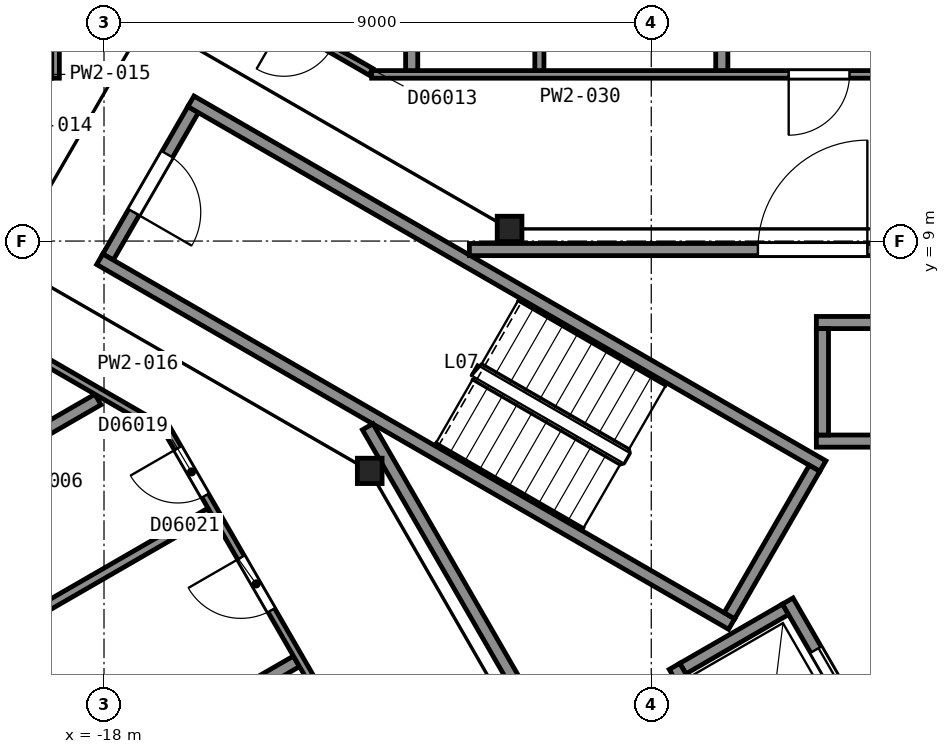
"""IFC4 building model, lengths in metres.
Left out: names, types, materials, properties, quantities, classifications, styles, units other than length and angle.
Written with IfcOpenShell. Run it as: python <this file> out.ifc"""

import sys

from ifc_helpers import new_model, si_unit, direction, frame, frame_2d, origin, origin_2d, place, context, subcontext, project, spatial, rectangle, i_section, extrude, element, fill, save


model = new_model("IFC4")
c1 = context("Model", 3, precision=1e-05, world=origin(), true_north=direction((0.0, 1.0)))
c2 = subcontext(c1, "Body", "Model", "MODEL_VIEW")
j1 = project(units=[si_unit("LENGTHUNIT", "METRE"), si_unit("PLANEANGLEUNIT", "RADIAN")], contexts=[c1])
p1 = place(None, origin())
s1 = spatial("IfcSite", under=j1, at=p1, CompositionType="ELEMENT")
p2 = place(p1, origin())
s2 = spatial("IfcBuilding", under=s1, at=p2, CompositionType="ELEMENT")
p3 = place(p2, frame((0.0, 0.0, 40.4)))
s3 = spatial("IfcBuildingStorey", under=s2, at=p3, CompositionType="ELEMENT", Elevation=40.4)
for number, where, z_axis, x_axis in (
    (1, (-11.33, 9.2, 0.0), (0.0, 0.0, 1.0), (1.0, 0.0, 0.0)),
    (2, (-13.63, 5.22, 0.0), (0.0, 0.0, 1.0), (1.0, 0.0, 0.0)),
):
    element("IfcColumn", number, at=place(p3, frame(where, z_axis=z_axis, x_axis=x_axis)), inside=s3, PredefinedType="COLUMN", context=c2, shape_type="SweptSolid", body=[
        extrude(i_section(OverallWidth=0.406, OverallDepth=0.417, WebThickness=0.03, FlangeThickness=0.048, FilletRadius=0.015, at=origin_2d()), origin(), (0.0, 0.0, 1.0), 3.6),
    ])
p4 = place(p3, frame((-16.534, 11.162, 0.0), z_axis=(0.0, 0.0, 1.0), x_axis=(-0.49998411664, -0.866034573852, 0.0)))
e3 = element("IfcWall", 3, at=p4, inside=s3, PredefinedType="PARTITIONING", context=c2, shape_type="SweptSolid", body=[
    extrude(rectangle(XDim=2.8, YDim=0.2, at=frame_2d((1.4, 0.0))), origin(), (0.0, 0.0, 1.0), 3.35),
])
p5 = place(p4, frame((0.85, 0.0, 0.0)))
e4 = element("IfcOpeningElement", 4, at=p5, cuts=e3, PredefinedType="OPENING", context=c2, shape_type="SweptSolid", body=[
    extrude(rectangle(XDim=1.1, YDim=2.1, at=frame_2d((0.55, 1.05))), frame((0.0, 0.11, 0.0), z_axis=(0.0, -1.0, 0.0), x_axis=(1.0, 0.0, 0.0)), (0.0, 0.0, 1.0), 0.22),
])
for number, where, z_axis, x_axis in (
    (5, (-7.678, 2.701, 0.0), (0.0, 0.0, 1.0), (-0.866, 0.5, 0.0)),
    (6, (-6.178, 5.299, 0.0), (0.0, 0.0, 1.0), (-0.866, 0.5, 0.0)),
):
    element("IfcWall", number, at=place(p3, frame(where, z_axis=z_axis, x_axis=x_axis)), inside=s3, PredefinedType="PARTITIONING", context=c2, shape_type="SweptSolid", body=[
        extrude(rectangle(XDim=12.0, YDim=0.2, at=frame_2d((6.0, 0.0))), origin(), (0.0, 0.0, 1.0), 3.35),
    ])
p6 = place(p3, frame((-6.315, 5.262, 0.0), z_axis=(0.0, 0.0, 1.0), x_axis=(-0.500049511043, -0.865996816683, 0.0)))
e7 = element("IfcWall", 7, at=p6, inside=s3, PredefinedType="PARTITIONING", context=c2, shape_type="SweptSolid", body=[
    extrude(rectangle(XDim=2.8, YDim=0.2, at=frame_2d((1.4, 0.0))), origin(), (0.0, 0.0, 1.0), 3.35),
])
for number, where, z_axis, x_axis in (
    (8, (-6.285, 5.71, 0.0), (0.0, 0.0, 1.0), (1.0, 0.0, 0.0)),
    (9, (-6.285, 7.66, 0.0), (0.0, 0.0, 1.0), (1.0, 0.0, 0.0)),
):
    element("IfcWall", number, at=place(p3, frame(where, z_axis=z_axis, x_axis=x_axis)), inside=s3, PredefinedType="PARTITIONING", context=c2, shape_type="SweptSolid", body=[
        extrude(rectangle(XDim=2.35, YDim=0.2, at=frame_2d((1.175, 0.0))), origin(), (0.0, 0.0, 1.0), 3.6),
    ])
p7 = place(p3, frame((-8.48, 1.969, 0.0), z_axis=(0.0, 0.0, 1.0), x_axis=(0.866000020948, 0.500043961785, 0.0)))
e10 = element("IfcWall", 10, at=p7, inside=s3, PredefinedType="PARTITIONING", context=c2, shape_type="SweptSolid", body=[
    extrude(rectangle(XDim=1.95, YDim=0.2, at=frame_2d((0.975, 0.0))), origin(), (0.0, 0.0, 1.0), 3.6),
])
p8 = place(p3, frame((-6.185, 5.81, 0.0), z_axis=(0.0, 0.0, 1.0), x_axis=(0.0, 1.0, 0.0)))
e11 = element("IfcWall", 11, at=p8, inside=s3, PredefinedType="PARTITIONING", context=c2, shape_type="SweptSolid", body=[
    extrude(rectangle(XDim=1.75, YDim=0.2, at=frame_2d((0.875, 0.0))), origin(), (0.0, 0.0, 1.0), 3.6),
])
p9 = place(p3, frame((-5.28, 0.525, 0.0), z_axis=(0.0, 0.0, 1.0), x_axis=(-0.500037662692, 0.866003658127, 0.0)))
e12 = element("IfcWall", 12, at=p9, inside=s3, PredefinedType="PARTITIONING", context=c2, shape_type="SweptSolid", body=[
    extrude(rectangle(XDim=2.95, YDim=0.2, at=frame_2d((1.475, 0.0))), origin(), (0.0, 0.0, 1.0), 3.6),
])
p10 = place(p9, frame((0.925, 0.0, 0.0)))
e13 = element("IfcOpeningElement", 13, at=p10, cuts=e12, PredefinedType="OPENING", context=c2, shape_type="SweptSolid", body=[
    extrude(rectangle(XDim=1.1, YDim=2.1, at=frame_2d((0.55, 1.05))), frame((0.0, 0.11, 0.0), z_axis=(0.0, -1.0, 0.0), x_axis=(1.0, 0.0, 0.0)), (0.0, 0.0, 1.0), 0.22),
])
p11 = place(p3, frame((-7.242, -0.376, 0.0), z_axis=(0.0, 0.0, 1.0), x_axis=(-0.499996545922, 0.866027397988, 0.0)))
e14 = element("IfcWall", 14, at=p11, inside=s3, PredefinedType="PARTITIONING", context=c2, shape_type="SweptSolid", body=[
    extrude(rectangle(XDim=2.75, YDim=0.2, at=frame_2d((1.375, 0.0))), origin(), (0.0, 0.0, 1.0), 3.6),
])
p12 = place(p3, frame((-13.664, 5.946, 0.0), z_axis=(0.0, 0.0, 1.0), x_axis=(0.499994327219, -0.866028678941, 0.0)))
e15 = element("IfcWall", 15, at=p12, inside=s3, PredefinedType="PARTITIONING", context=c2, shape_type="SweptSolid", body=[
    extrude(rectangle(XDim=23.968, YDim=0.2, at=frame_2d((11.984, 0.0))), origin(), (0.0, 0.0, 1.0), 3.35),
])
p13 = place(p3, frame((0.263, 8.86, 0.0), z_axis=(0.0, 0.0, 1.0), x_axis=(-1.0, 0.0, 0.0)))
e16 = element("IfcWall", 16, at=p13, inside=s3, PredefinedType="PARTITIONING", context=c2, shape_type="SweptSolid", body=[
    extrude(rectangle(XDim=12.254, YDim=0.2, at=frame_2d((6.127, 0.0))), origin(), (0.0, 0.0, 1.0), 3.35),
])
p14 = place(p13, frame((5.709, 0.0, 0.0)))
e17 = element("IfcOpeningElement", 17, at=p14, cuts=e16, PredefinedType="OPENING", context=c2, shape_type="SweptSolid", body=[
    extrude(rectangle(XDim=1.8, YDim=2.1, at=frame_2d((0.9, 1.05))), frame((0.0, 0.11, 0.0), z_axis=(0.0, -1.0, 0.0), x_axis=(1.0, 0.0, 0.0)), (0.0, 0.0, 1.0), 0.22),
])
p15 = place(p3, frame((-23.693, 0.247, 0.0), z_axis=(0.0, 0.0, 1.0), x_axis=(0.866031705461, 0.499989085017, 0.0)))
e18 = element("IfcWall", 18, at=p15, inside=s3, PredefinedType="PARTITIONING", context=c2, shape_type="SweptSolid", body=[
    extrude(rectangle(XDim=8.587, YDim=0.15, at=frame_2d((4.293, 0.0))), origin(), (0.0, 0.0, 1.0), 2.613),
])
p16 = place(p3, frame((-21.312, 4.54, 0.0), z_axis=(0.0, 0.0, 1.0), x_axis=(0.866071583234, 0.499920006315, 0.0)))
e19 = element("IfcWall", 19, at=p16, inside=s3, PredefinedType="PARTITIONING", context=c2, shape_type="SweptSolid", body=[
    extrude(rectangle(XDim=3.708, YDim=0.2, at=frame_2d((1.854, 0.0))), origin(), (0.0, 0.0, 1.0), 2.613),
])
p17 = place(p3, frame((-19.26, 7.194, 0.0), z_axis=(0.0, 0.0, 1.0), x_axis=(0.865944638795, -0.50013986298, 0.0)))
e20 = element("IfcWall", 20, at=p17, inside=s3, PredefinedType="PARTITIONING", context=c2, shape_type="SweptSolid", body=[
    extrude(rectangle(XDim=2.599, YDim=0.125, at=frame_2d((1.299, 0.0))), origin(), (0.0, 0.0, 1.0), 2.613),
])
p18 = place(p3, frame((-18.797, 11.678, 0.0), z_axis=(0.0, 0.0, 1.0), x_axis=(0.0, 1.0, 0.0)))
e21 = element("IfcWall", 21, at=p18, inside=s3, PredefinedType="PARTITIONING", context=c2, shape_type="SweptSolid", body=[
    extrude(rectangle(XDim=2.394, YDim=0.125, at=frame_2d((1.197, 0.0))), origin(), (0.0, 0.0, 1.0), 2.613),
])
p19 = place(p18, frame((0.562, 0.0, 0.0)))
e22 = element("IfcOpeningElement", 22, at=p19, cuts=e21, PredefinedType="OPENING", context=c2, shape_type="SweptSolid", body=[
    extrude(rectangle(XDim=0.9, YDim=2.1, at=frame_2d((0.45, 1.05))), frame((0.0, 0.073, 0.0), z_axis=(0.0, -1.0, 0.0), x_axis=(1.0, 0.0, 0.0)), (0.0, 0.0, 1.0), 0.145),
])
p20 = place(p3, frame((-17.725, 0.419, 0.0), z_axis=(0.0, 0.0, 1.0), x_axis=(0.865960142641, 0.500113018585, 0.0)))
e23 = element("IfcWall", 23, at=p20, inside=s3, PredefinedType="PARTITIONING", context=c2, shape_type="SweptSolid", body=[
    extrude(rectangle(XDim=3.337, YDim=0.2, at=frame_2d((1.668, 0.0))), origin(), (0.0, 0.0, 1.0), 2.613),
])
p21 = place(p3, frame((-3.766, -16.958, 0.0), z_axis=(0.0, 0.0, 1.0), x_axis=(-0.500024758804, 0.866011108811, 0.0)))
e24 = element("IfcWall", 24, at=p21, inside=s3, PredefinedType="PARTITIONING", context=c2, shape_type="SweptSolid", body=[
    extrude(rectangle(XDim=26.402, YDim=0.125, at=frame_2d((13.201, 0.0))), origin(), (0.0, 0.0, 1.0), 2.613),
])
p22 = place(p21, frame((25.139, 0.0, 0.0)))
e25 = element("IfcOpeningElement", 25, at=p22, cuts=e24, PredefinedType="OPENING", context=c2, shape_type="SweptSolid", body=[
    extrude(rectangle(XDim=0.9, YDim=2.1, at=frame_2d((0.45, 1.05))), frame((0.0, 0.073, 0.0), z_axis=(0.0, -1.0, 0.0), x_axis=(1.0, 0.0, 0.0)), (0.0, 0.0, 1.0), 0.145),
])
p23 = place(p21, frame((22.963, 0.0, 0.0)))
e26 = element("IfcOpeningElement", 26, at=p23, cuts=e24, PredefinedType="OPENING", context=c2, shape_type="SweptSolid", body=[
    extrude(rectangle(XDim=1.0, YDim=2.1, at=frame_2d((0.5, 1.05))), frame((0.0, 0.073, 0.0), z_axis=(0.0, -1.0, 0.0), x_axis=(1.0, 0.0, 0.0)), (0.0, 0.0, 1.0), 0.145),
])
p24 = place(p21, frame((15.228, 0.0, 0.0)))
e27 = element("IfcOpeningElement", 27, at=p24, cuts=e24, PredefinedType="OPENING", context=c2, shape_type="SweptSolid", body=[
    extrude(rectangle(XDim=0.9, YDim=2.1, at=frame_2d((0.45, 1.05))), frame((0.0, 0.073, 0.0), z_axis=(0.0, -1.0, 0.0), x_axis=(1.0, 0.0, 0.0)), (0.0, 0.0, 1.0), 0.145),
])
p25 = place(p21, frame((12.702, 0.0, 0.0)))
e28 = element("IfcOpeningElement", 28, at=p25, cuts=e24, PredefinedType="OPENING", context=c2, shape_type="SweptSolid", body=[
    extrude(rectangle(XDim=0.9, YDim=2.1, at=frame_2d((0.45, 1.05))), frame((0.0, 0.073, 0.0), z_axis=(0.0, -1.0, 0.0), x_axis=(1.0, 0.0, 0.0)), (0.0, 0.0, 1.0), 0.145),
])
p26 = place(p21, frame((5.624, 0.0, 0.0)))
e29 = element("IfcOpeningElement", 29, at=p26, cuts=e24, PredefinedType="OPENING", context=c2, shape_type="SweptSolid", body=[
    extrude(rectangle(XDim=0.9, YDim=2.1, at=frame_2d((0.45, 1.05))), frame((0.0, 0.073, 0.0), z_axis=(0.0, -1.0, 0.0), x_axis=(1.0, 0.0, 0.0)), (0.0, 0.0, 1.0), 0.145),
])
p27 = place(p21, frame((2.843, 0.0, 0.0)))
e30 = element("IfcOpeningElement", 30, at=p27, cuts=e24, PredefinedType="OPENING", context=c2, shape_type="SweptSolid", body=[
    extrude(rectangle(XDim=0.9, YDim=2.1, at=frame_2d((0.45, 1.05))), frame((0.0, 0.073, 0.0), z_axis=(0.0, -1.0, 0.0), x_axis=(1.0, 0.0, 0.0)), (0.0, 0.0, 1.0), 0.145),
])
p28 = place(p3, frame((-15.778, 13.035, 0.0), z_axis=(0.0, 0.0, 1.0), x_axis=(0.866110899347, -0.499851888094, 0.0)))
e31 = element("IfcWall", 31, at=p28, inside=s3, PredefinedType="PARTITIONING", context=c2, shape_type="SweptSolid", body=[
    extrude(rectangle(XDim=2.504, YDim=0.125, at=frame_2d((1.252, 0.0))), origin(), (0.0, 0.0, 1.0), 2.613),
])
p29 = place(p28, frame((0.85, 0.0, 0.0)))
e32 = element("IfcOpeningElement", 32, at=p29, cuts=e31, PredefinedType="OPENING", context=c2, shape_type="SweptSolid", body=[
    extrude(rectangle(XDim=0.9, YDim=2.1, at=frame_2d((0.45, 1.05))), frame((0.0, 0.073, 0.0), z_axis=(0.0, -1.0, 0.0), x_axis=(1.0, 0.0, 0.0)), (0.0, 0.0, 1.0), 0.145),
])
p30 = place(p3, frame((-13.598, 11.741, 0.0), z_axis=(0.0, 0.0, 1.0), x_axis=(1.0, 0.0, 0.0)))
e33 = element("IfcWall", 33, at=p30, inside=s3, PredefinedType="PARTITIONING", context=c2, shape_type="SweptSolid", body=[
    extrude(rectangle(XDim=27.197, YDim=0.125, at=frame_2d((13.598, 0.0))), origin(), (0.0, 0.0, 1.0), 2.613),
])
p31 = place(p30, frame((20.107, 0.0, 0.0)))
e34 = element("IfcOpeningElement", 34, at=p31, cuts=e33, PredefinedType="OPENING", context=c2, shape_type="SweptSolid", body=[
    extrude(rectangle(XDim=0.9, YDim=2.1, at=frame_2d((0.45, 1.05))), frame((0.0, 0.073, 0.0), z_axis=(0.0, -1.0, 0.0), x_axis=(1.0, 0.0, 0.0)), (0.0, 0.0, 1.0), 0.145),
])
p32 = place(p30, frame((16.97, 0.0, 0.0)))
e35 = element("IfcOpeningElement", 35, at=p32, cuts=e33, PredefinedType="OPENING", context=c2, shape_type="SweptSolid", body=[
    extrude(rectangle(XDim=0.9, YDim=2.1, at=frame_2d((0.45, 1.05))), frame((0.0, 0.073, 0.0), z_axis=(0.0, -1.0, 0.0), x_axis=(1.0, 0.0, 0.0)), (0.0, 0.0, 1.0), 0.145),
])
p33 = place(p30, frame((9.934, 0.0, 0.0)))
e36 = element("IfcOpeningElement", 36, at=p33, cuts=e33, PredefinedType="OPENING", context=c2, shape_type="SweptSolid", body=[
    extrude(rectangle(XDim=0.9, YDim=2.1, at=frame_2d((0.45, 1.05))), frame((0.0, 0.073, 0.0), z_axis=(0.0, -1.0, 0.0), x_axis=(1.0, 0.0, 0.0)), (0.0, 0.0, 1.0), 0.145),
])
p34 = place(p30, frame((6.858, 0.0, 0.0)))
e37 = element("IfcOpeningElement", 37, at=p34, cuts=e33, PredefinedType="OPENING", context=c2, shape_type="SweptSolid", body=[
    extrude(rectangle(XDim=1.0, YDim=2.1, at=frame_2d((0.5, 1.05))), frame((0.0, 0.073, 0.0), z_axis=(0.0, -1.0, 0.0), x_axis=(1.0, 0.0, 0.0)), (0.0, 0.0, 1.0), 0.145),
])
p35 = place(p3, frame((-12.94, 11.803, 0.0), z_axis=(0.0, 0.0, 1.0), x_axis=(0.0, 1.0, 0.0)))
e38 = element("IfcWall", 38, at=p35, inside=s3, PredefinedType="PARTITIONING", context=c2, shape_type="SweptSolid", body=[
    extrude(rectangle(XDim=2.812, YDim=0.2, at=frame_2d((1.406, 0.0))), origin(), (0.0, 0.0, 1.0), 2.613),
])
p36 = place(p3, frame((-10.84, 11.803, 0.0), z_axis=(0.0, 0.0, 1.0), x_axis=(0.0, 1.0, 0.0)))
e39 = element("IfcWall", 39, at=p36, inside=s3, PredefinedType="PARTITIONING", context=c2, shape_type="SweptSolid", body=[
    extrude(rectangle(XDim=8.592, YDim=0.15, at=frame_2d((4.296, 0.0))), origin(), (0.0, 0.0, 1.0), 2.613),
])
p37 = place(p3, frame((-7.84, 11.803, 0.0), z_axis=(0.0, 0.0, 1.0), x_axis=(0.0, 1.0, 0.0)))
e40 = element("IfcWall", 40, at=p37, inside=s3, PredefinedType="PARTITIONING", context=c2, shape_type="SweptSolid", body=[
    extrude(rectangle(XDim=3.338, YDim=0.2, at=frame_2d((1.669, 0.0))), origin(), (0.0, 0.0, 1.0), 2.613),
])
p38 = place(p5, origin())
e41 = element("IfcDoor", 41, at=p38, inside=s3, OperationType="SINGLE_SWING_RIGHT", PredefinedType="DOOR", context=c2, shape_type="SweptSolid", body=[
    extrude(rectangle(XDim=1.1, YDim=2.1, at=frame_2d((0.55, 1.05))), frame((0.0, 0.025, 0.0), z_axis=(0.0, -1.0, 0.0), x_axis=(1.0, 0.0, 0.0)), (0.0, 0.0, 1.0), 0.05),
])
fill(e4, e41)
p39 = place(p10, origin())
e42 = element("IfcDoor", 42, at=p39, inside=s3, OperationType="SLIDING_TO_LEFT", PredefinedType="DOOR", context=c2, shape_type="SweptSolid", body=[
    extrude(rectangle(XDim=1.1, YDim=2.1, at=frame_2d((0.55, 1.05))), frame((0.0, 0.025, 0.0), z_axis=(0.0, -1.0, 0.0), x_axis=(1.0, 0.0, 0.0)), (0.0, 0.0, 1.0), 0.05),
])
fill(e13, e42)
p40 = place(p14, origin())
e43 = element("IfcDoor", 43, at=p40, inside=s3, OperationType="DOUBLE_DOOR_SINGLE_SWING", PredefinedType="DOOR", context=c2, shape_type="SweptSolid", body=[
    extrude(rectangle(XDim=1.8, YDim=2.1, at=frame_2d((0.9, 1.05))), frame((0.0, 0.025, 0.0), z_axis=(0.0, -1.0, 0.0), x_axis=(1.0, 0.0, 0.0)), (0.0, 0.0, 1.0), 0.05),
])
fill(e17, e43)
p41 = place(p22, origin())
e44 = element("IfcDoor", 44, at=p41, inside=s3, OperationType="SINGLE_SWING_RIGHT", PredefinedType="DOOR", context=c2, shape_type="SweptSolid", body=[
    extrude(rectangle(XDim=0.9, YDim=2.1, at=frame_2d((0.45, 1.05))), frame((0.0, 0.025, 0.0), z_axis=(0.0, -1.0, 0.0), x_axis=(1.0, 0.0, 0.0)), (0.0, 0.0, 1.0), 0.05),
])
fill(e25, e44)
p42 = place(p23, origin())
e45 = element("IfcDoor", 45, at=p42, inside=s3, OperationType="SINGLE_SWING_RIGHT", PredefinedType="DOOR", context=c2, shape_type="SweptSolid", body=[
    extrude(rectangle(XDim=1.0, YDim=2.1, at=frame_2d((0.5, 1.05))), frame((0.0, 0.025, 0.0), z_axis=(0.0, -1.0, 0.0), x_axis=(1.0, 0.0, 0.0)), (0.0, 0.0, 1.0), 0.05),
])
fill(e26, e45)
p43 = place(p34, origin())
e46 = element("IfcDoor", 46, at=p43, inside=s3, OperationType="SINGLE_SWING_LEFT", PredefinedType="DOOR", context=c2, shape_type="SweptSolid", body=[
    extrude(rectangle(XDim=1.0, YDim=2.1, at=frame_2d((0.5, 1.05))), frame((0.0, 0.025, 0.0), z_axis=(0.0, -1.0, 0.0), x_axis=(1.0, 0.0, 0.0)), (0.0, 0.0, 1.0), 0.05),
])
fill(e37, e46)
save(model, sys.argv[1])
